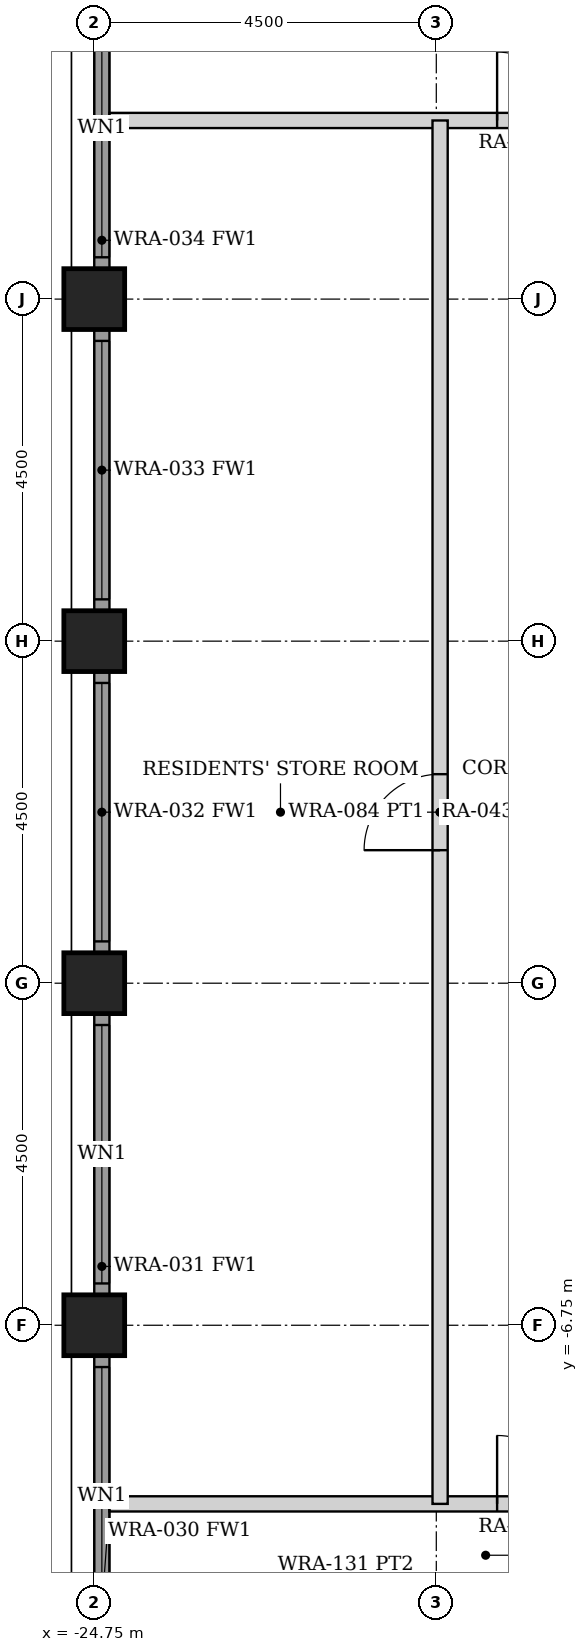
"""IFC4 building model, lengths in metres.
Left out: names, types, materials, properties, quantities, classifications, styles, units other than length and angle.
Written with IfcOpenShell. Run it as: python <this file> out.ifc"""

import sys

from ifc_helpers import new_model, si_unit, direction, frame, frame_2d, origin, origin_2d, place, context, subcontext, project, spatial, rectangle, hollow_rectangle, extrude, element, fill, save


model = new_model("IFC4")
c1 = context("Model", 3, precision=1e-05, world=origin(), true_north=direction((0.0, 1.0)))
c2 = subcontext(c1, "Body", "Model", "MODEL_VIEW")
j1 = project(units=[si_unit("LENGTHUNIT", "METRE"), si_unit("PLANEANGLEUNIT", "RADIAN")], contexts=[c1])
p1 = place(None, origin())
s1 = spatial("IfcSite", under=j1, at=p1, CompositionType="ELEMENT")
p2 = place(p1, origin())
s2 = spatial("IfcBuilding", under=s1, at=p2, CompositionType="ELEMENT")
p3 = place(p2, frame((0.0, 0.0, 30.0)))
s3 = spatial("IfcBuildingStorey", under=s2, at=p3, CompositionType="ELEMENT", Elevation=30.0)
for number, where, z_axis, x_axis in (
    (1, (-24.75, -6.75, 0.0), (0.0, 0.0, 1.0), (1.0, 0.0, 0.0)),
    (2, (-24.75, -2.25, 0.0), (0.0, 0.0, 1.0), (1.0, 0.0, 0.0)),
    (3, (-24.75, 2.25, 0.0), (0.0, 0.0, 1.0), (1.0, 0.0, 0.0)),
    (4, (-24.75, 6.75, 0.0), (0.0, 0.0, 1.0), (1.0, 0.0, 0.0)),
):
    element("IfcColumn", number, at=place(p3, frame(where, z_axis=z_axis, x_axis=x_axis)), inside=s3, PredefinedType="COLUMN", context=c2, shape_type="SweptSolid", body=[
        extrude(hollow_rectangle(XDim=0.8, YDim=0.8, WallThickness=0.08, at=origin_2d()), origin(), (0.0, 0.0, 1.0), 3.5),
    ])
p4 = place(p3, frame((-24.65, -10.845, 0.0), z_axis=(0.0, 0.0, 1.0), x_axis=(0.0, 1.0, 0.0)))
e5 = element("IfcWall", 5, at=p4, inside=s3, PredefinedType="SOLIDWALL", context=c2, shape_type="SweptSolid", body=[
    extrude(rectangle(XDim=3.69, YDim=0.2, at=frame_2d((1.845, 0.0))), origin(), (0.0, 0.0, 1.0), 2.379),
])
p5 = place(p4, frame((0.145, 0.0, 0.3)))
e6 = element("IfcOpeningElement", 6, at=p5, cuts=e5, PredefinedType="OPENING", context=c2, shape_type="SweptSolid", body=[
    extrude(rectangle(XDim=3.4, YDim=1.929, at=frame_2d((1.7, 0.964))), frame((0.0, 0.11, 0.0), z_axis=(0.0, -1.0, 0.0), x_axis=(1.0, 0.0, 0.0)), (0.0, 0.0, 1.0), 0.22),
])
p6 = place(p3, frame((-24.65, -6.345, 0.0), z_axis=(0.0, 0.0, 1.0), x_axis=(0.0, 1.0, 0.0)))
e7 = element("IfcWall", 7, at=p6, inside=s3, PredefinedType="SOLIDWALL", context=c2, shape_type="SweptSolid", body=[
    extrude(rectangle(XDim=3.69, YDim=0.2, at=frame_2d((1.845, 0.0))), origin(), (0.0, 0.0, 1.0), 2.379),
])
p7 = place(p6, frame((0.145, 0.0, 0.3)))
e8 = element("IfcOpeningElement", 8, at=p7, cuts=e7, PredefinedType="OPENING", context=c2, shape_type="SweptSolid", body=[
    extrude(rectangle(XDim=3.4, YDim=1.929, at=frame_2d((1.7, 0.964))), frame((0.0, 0.11, 0.0), z_axis=(0.0, -1.0, 0.0), x_axis=(1.0, 0.0, 0.0)), (0.0, 0.0, 1.0), 0.22),
])
p8 = place(p3, frame((-24.65, -1.845, 0.0), z_axis=(0.0, 0.0, 1.0), x_axis=(0.0, 1.0, 0.0)))
e9 = element("IfcWall", 9, at=p8, inside=s3, PredefinedType="SOLIDWALL", context=c2, shape_type="SweptSolid", body=[
    extrude(rectangle(XDim=3.69, YDim=0.2, at=frame_2d((1.845, 0.0))), origin(), (0.0, 0.0, 1.0), 2.379),
])
p9 = place(p8, frame((0.145, 0.0, 0.3)))
e10 = element("IfcOpeningElement", 10, at=p9, cuts=e9, PredefinedType="OPENING", context=c2, shape_type="SweptSolid", body=[
    extrude(rectangle(XDim=3.4, YDim=1.929, at=frame_2d((1.7, 0.964))), frame((0.0, 0.11, 0.0), z_axis=(0.0, -1.0, 0.0), x_axis=(1.0, 0.0, 0.0)), (0.0, 0.0, 1.0), 0.22),
])
p10 = place(p3, frame((-24.65, 2.655, 0.0), z_axis=(0.0, 0.0, 1.0), x_axis=(0.0, 1.0, 0.0)))
e11 = element("IfcWall", 11, at=p10, inside=s3, PredefinedType="SOLIDWALL", context=c2, shape_type="SweptSolid", body=[
    extrude(rectangle(XDim=3.69, YDim=0.2, at=frame_2d((1.845, 0.0))), origin(), (0.0, 0.0, 1.0), 2.379),
])
p11 = place(p10, frame((0.145, 0.0, 0.3)))
e12 = element("IfcOpeningElement", 12, at=p11, cuts=e11, PredefinedType="OPENING", context=c2, shape_type="SweptSolid", body=[
    extrude(rectangle(XDim=3.4, YDim=1.929, at=frame_2d((1.7, 0.964))), frame((0.0, 0.11, 0.0), z_axis=(0.0, -1.0, 0.0), x_axis=(1.0, 0.0, 0.0)), (0.0, 0.0, 1.0), 0.22),
])
p12 = place(p3, frame((-24.65, 7.155, 0.0), z_axis=(0.0, 0.0, 1.0), x_axis=(0.0, 1.0, 0.0)))
e13 = element("IfcWall", 13, at=p12, inside=s3, PredefinedType="SOLIDWALL", context=c2, shape_type="SweptSolid", body=[
    extrude(rectangle(XDim=3.69, YDim=0.2, at=frame_2d((1.845, 0.0))), origin(), (0.0, 0.0, 1.0), 2.379),
])
p13 = place(p12, frame((0.145, 0.0, 0.3)))
e14 = element("IfcOpeningElement", 14, at=p13, cuts=e13, PredefinedType="OPENING", context=c2, shape_type="SweptSolid", body=[
    extrude(rectangle(XDim=3.4, YDim=1.929, at=frame_2d((1.7, 0.964))), frame((0.0, 0.11, 0.0), z_axis=(0.0, -1.0, 0.0), x_axis=(1.0, 0.0, 0.0)), (0.0, 0.0, 1.0), 0.22),
])
p14 = place(p3, frame((-24.55, 9.1, 0.0), z_axis=(0.0, 0.0, 1.0), x_axis=(1.0, 0.0, 0.0)))
e15 = element("IfcWall", 15, at=p14, inside=s3, PredefinedType="PARTITIONING", context=c2, shape_type="SweptSolid", body=[
    extrude(rectangle(XDim=49.1, YDim=0.2, at=frame_2d((24.55, 0.0))), origin(), (0.0, 0.0, 1.0), 2.373),
])
p15 = place(p14, frame((5.1, 0.0, 0.0)))
e16 = element("IfcOpeningElement", 16, at=p15, cuts=e15, PredefinedType="OPENING", context=c2, shape_type="SweptSolid", body=[
    extrude(rectangle(XDim=0.9, YDim=2.1, at=frame_2d((0.45, 1.05))), frame((0.0, 0.11, 0.0), z_axis=(0.0, -1.0, 0.0), x_axis=(1.0, 0.0, 0.0)), (0.0, 0.0, 1.0), 0.22),
])
p16 = place(p14, frame((9.0, 0.0, 0.0)))
e17 = element("IfcOpeningElement", 17, at=p16, cuts=e15, PredefinedType="OPENING", context=c2, shape_type="SweptSolid", body=[
    extrude(rectangle(XDim=0.9, YDim=2.1, at=frame_2d((0.45, 1.05))), frame((0.0, 0.11, 0.0), z_axis=(0.0, -1.0, 0.0), x_axis=(1.0, 0.0, 0.0)), (0.0, 0.0, 1.0), 0.22),
])
p17 = place(p14, frame((13.5, 0.0, 0.0)))
e18 = element("IfcOpeningElement", 18, at=p17, cuts=e15, PredefinedType="OPENING", context=c2, shape_type="SweptSolid", body=[
    extrude(rectangle(XDim=0.9, YDim=2.1, at=frame_2d((0.45, 1.05))), frame((0.0, 0.11, 0.0), z_axis=(0.0, -1.0, 0.0), x_axis=(1.0, 0.0, 0.0)), (0.0, 0.0, 1.0), 0.22),
])
p18 = place(p14, frame((18.0, 0.0, 0.0)))
e19 = element("IfcOpeningElement", 19, at=p18, cuts=e15, PredefinedType="OPENING", context=c2, shape_type="SweptSolid", body=[
    extrude(rectangle(XDim=0.9, YDim=2.1, at=frame_2d((0.45, 1.05))), frame((0.0, 0.11, 0.0), z_axis=(0.0, -1.0, 0.0), x_axis=(1.0, 0.0, 0.0)), (0.0, 0.0, 1.0), 0.22),
])
p19 = place(p14, frame((22.5, 0.0, 0.0)))
e20 = element("IfcOpeningElement", 20, at=p19, cuts=e15, PredefinedType="OPENING", context=c2, shape_type="SweptSolid", body=[
    extrude(rectangle(XDim=0.9, YDim=2.1, at=frame_2d((0.45, 1.05))), frame((0.0, 0.11, 0.0), z_axis=(0.0, -1.0, 0.0), x_axis=(1.0, 0.0, 0.0)), (0.0, 0.0, 1.0), 0.22),
])
p20 = place(p14, frame((27.0, 0.0, 0.0)))
e21 = element("IfcOpeningElement", 21, at=p20, cuts=e15, PredefinedType="OPENING", context=c2, shape_type="SweptSolid", body=[
    extrude(rectangle(XDim=0.9, YDim=2.1, at=frame_2d((0.45, 1.05))), frame((0.0, 0.11, 0.0), z_axis=(0.0, -1.0, 0.0), x_axis=(1.0, 0.0, 0.0)), (0.0, 0.0, 1.0), 0.22),
])
p21 = place(p14, frame((31.5, 0.0, 0.0)))
e22 = element("IfcOpeningElement", 22, at=p21, cuts=e15, PredefinedType="OPENING", context=c2, shape_type="SweptSolid", body=[
    extrude(rectangle(XDim=0.9, YDim=2.1, at=frame_2d((0.45, 1.05))), frame((0.0, 0.11, 0.0), z_axis=(0.0, -1.0, 0.0), x_axis=(1.0, 0.0, 0.0)), (0.0, 0.0, 1.0), 0.22),
])
p22 = place(p14, frame((36.0, 0.0, 0.0)))
e23 = element("IfcOpeningElement", 23, at=p22, cuts=e15, PredefinedType="OPENING", context=c2, shape_type="SweptSolid", body=[
    extrude(rectangle(XDim=0.9, YDim=2.1, at=frame_2d((0.45, 1.05))), frame((0.0, 0.11, 0.0), z_axis=(0.0, -1.0, 0.0), x_axis=(1.0, 0.0, 0.0)), (0.0, 0.0, 1.0), 0.22),
])
p23 = place(p14, frame((43.1, 0.0, 0.0)))
e24 = element("IfcOpeningElement", 24, at=p23, cuts=e15, PredefinedType="OPENING", context=c2, shape_type="SweptSolid", body=[
    extrude(rectangle(XDim=0.9, YDim=2.1, at=frame_2d((0.45, 1.05))), frame((0.0, 0.11, 0.0), z_axis=(0.0, -1.0, 0.0), x_axis=(1.0, 0.0, 0.0)), (0.0, 0.0, 1.0), 0.22),
])
p24 = place(p3, frame((-24.55, -9.1, 0.0), z_axis=(0.0, 0.0, 1.0), x_axis=(1.0, 0.0, 0.0)))
e25 = element("IfcWall", 25, at=p24, inside=s3, PredefinedType="PARTITIONING", context=c2, shape_type="SweptSolid", body=[
    extrude(rectangle(XDim=49.1, YDim=0.2, at=frame_2d((24.55, 0.0))), origin(), (0.0, 0.0, 1.0), 2.373),
])
p25 = place(p24, frame((5.1, 0.0, 0.0)))
e26 = element("IfcOpeningElement", 26, at=p25, cuts=e25, PredefinedType="OPENING", context=c2, shape_type="SweptSolid", body=[
    extrude(rectangle(XDim=0.9, YDim=2.1, at=frame_2d((0.45, 1.05))), frame((0.0, 0.11, 0.0), z_axis=(0.0, -1.0, 0.0), x_axis=(1.0, 0.0, 0.0)), (0.0, 0.0, 1.0), 0.22),
])
p26 = place(p24, frame((9.0, 0.0, 0.0)))
e27 = element("IfcOpeningElement", 27, at=p26, cuts=e25, PredefinedType="OPENING", context=c2, shape_type="SweptSolid", body=[
    extrude(rectangle(XDim=0.9, YDim=2.1, at=frame_2d((0.45, 1.05))), frame((0.0, 0.11, 0.0), z_axis=(0.0, -1.0, 0.0), x_axis=(1.0, 0.0, 0.0)), (0.0, 0.0, 1.0), 0.22),
])
p27 = place(p24, frame((13.5, 0.0, 0.0)))
e28 = element("IfcOpeningElement", 28, at=p27, cuts=e25, PredefinedType="OPENING", context=c2, shape_type="SweptSolid", body=[
    extrude(rectangle(XDim=0.9, YDim=2.1, at=frame_2d((0.45, 1.05))), frame((0.0, 0.11, 0.0), z_axis=(0.0, -1.0, 0.0), x_axis=(1.0, 0.0, 0.0)), (0.0, 0.0, 1.0), 0.22),
])
p28 = place(p24, frame((18.0, 0.0, 0.0)))
e29 = element("IfcOpeningElement", 29, at=p28, cuts=e25, PredefinedType="OPENING", context=c2, shape_type="SweptSolid", body=[
    extrude(rectangle(XDim=0.9, YDim=2.1, at=frame_2d((0.45, 1.05))), frame((0.0, 0.11, 0.0), z_axis=(0.0, -1.0, 0.0), x_axis=(1.0, 0.0, 0.0)), (0.0, 0.0, 1.0), 0.22),
])
p29 = place(p24, frame((22.5, 0.0, 0.0)))
e30 = element("IfcOpeningElement", 30, at=p29, cuts=e25, PredefinedType="OPENING", context=c2, shape_type="SweptSolid", body=[
    extrude(rectangle(XDim=0.9, YDim=2.1, at=frame_2d((0.45, 1.05))), frame((0.0, 0.11, 0.0), z_axis=(0.0, -1.0, 0.0), x_axis=(1.0, 0.0, 0.0)), (0.0, 0.0, 1.0), 0.22),
])
p30 = place(p24, frame((27.0, 0.0, 0.0)))
e31 = element("IfcOpeningElement", 31, at=p30, cuts=e25, PredefinedType="OPENING", context=c2, shape_type="SweptSolid", body=[
    extrude(rectangle(XDim=0.9, YDim=2.1, at=frame_2d((0.45, 1.05))), frame((0.0, 0.11, 0.0), z_axis=(0.0, -1.0, 0.0), x_axis=(1.0, 0.0, 0.0)), (0.0, 0.0, 1.0), 0.22),
])
p31 = place(p24, frame((31.5, 0.0, 0.0)))
e32 = element("IfcOpeningElement", 32, at=p31, cuts=e25, PredefinedType="OPENING", context=c2, shape_type="SweptSolid", body=[
    extrude(rectangle(XDim=0.9, YDim=2.1, at=frame_2d((0.45, 1.05))), frame((0.0, 0.11, 0.0), z_axis=(0.0, -1.0, 0.0), x_axis=(1.0, 0.0, 0.0)), (0.0, 0.0, 1.0), 0.22),
])
p32 = place(p24, frame((36.0, 0.0, 0.0)))
e33 = element("IfcOpeningElement", 33, at=p32, cuts=e25, PredefinedType="OPENING", context=c2, shape_type="SweptSolid", body=[
    extrude(rectangle(XDim=0.9, YDim=2.1, at=frame_2d((0.45, 1.05))), frame((0.0, 0.11, 0.0), z_axis=(0.0, -1.0, 0.0), x_axis=(1.0, 0.0, 0.0)), (0.0, 0.0, 1.0), 0.22),
])
p33 = place(p24, frame((43.1, 0.0, 0.0)))
e34 = element("IfcOpeningElement", 34, at=p33, cuts=e25, PredefinedType="OPENING", context=c2, shape_type="SweptSolid", body=[
    extrude(rectangle(XDim=0.9, YDim=2.1, at=frame_2d((0.45, 1.05))), frame((0.0, 0.11, 0.0), z_axis=(0.0, -1.0, 0.0), x_axis=(1.0, 0.0, 0.0)), (0.0, 0.0, 1.0), 0.22),
])
p34 = place(p3, frame((-20.2, -9.1, 0.0), z_axis=(0.0, 0.0, 1.0), x_axis=(0.0, 1.0, 0.0)))
e35 = element("IfcWall", 35, at=p34, inside=s3, PredefinedType="PARTITIONING", context=c2, shape_type="SweptSolid", body=[
    extrude(rectangle(XDim=18.2, YDim=0.2, at=frame_2d((9.1, 0.0))), origin(), (0.0, 0.0, 1.0), 2.373),
])
p35 = place(p34, frame((8.6, 0.0, 0.0)))
e36 = element("IfcOpeningElement", 36, at=p35, cuts=e35, PredefinedType="OPENING", context=c2, shape_type="SweptSolid", body=[
    extrude(rectangle(XDim=1.0, YDim=2.1, at=frame_2d((0.5, 1.05))), frame((0.0, 0.11, 0.0), z_axis=(0.0, -1.0, 0.0), x_axis=(1.0, 0.0, 0.0)), (0.0, 0.0, 1.0), 0.22),
])
p36 = place(p5, origin())
e37 = element("IfcWindow", 37, at=p36, inside=s3, PartitioningType="SINGLE_PANEL", PredefinedType="WINDOW", context=c2, shape_type="SweptSolid", body=[
    extrude(rectangle(XDim=3.4, YDim=1.929, at=frame_2d((1.7, 0.964))), frame((0.0, 0.03, 0.0), z_axis=(0.0, -1.0, 0.0), x_axis=(1.0, 0.0, 0.0)), (0.0, 0.0, 1.0), 0.06),
])
fill(e6, e37)
p37 = place(p7, origin())
e38 = element("IfcWindow", 38, at=p37, inside=s3, PartitioningType="SINGLE_PANEL", PredefinedType="WINDOW", context=c2, shape_type="SweptSolid", body=[
    extrude(rectangle(XDim=3.4, YDim=1.929, at=frame_2d((1.7, 0.964))), frame((0.0, 0.03, 0.0), z_axis=(0.0, -1.0, 0.0), x_axis=(1.0, 0.0, 0.0)), (0.0, 0.0, 1.0), 0.06),
])
fill(e8, e38)
p38 = place(p9, origin())
e39 = element("IfcWindow", 39, at=p38, inside=s3, PartitioningType="SINGLE_PANEL", PredefinedType="WINDOW", context=c2, shape_type="SweptSolid", body=[
    extrude(rectangle(XDim=3.4, YDim=1.929, at=frame_2d((1.7, 0.964))), frame((0.0, 0.03, 0.0), z_axis=(0.0, -1.0, 0.0), x_axis=(1.0, 0.0, 0.0)), (0.0, 0.0, 1.0), 0.06),
])
fill(e10, e39)
p39 = place(p11, origin())
e40 = element("IfcWindow", 40, at=p39, inside=s3, PartitioningType="SINGLE_PANEL", PredefinedType="WINDOW", context=c2, shape_type="SweptSolid", body=[
    extrude(rectangle(XDim=3.4, YDim=1.929, at=frame_2d((1.7, 0.964))), frame((0.0, 0.03, 0.0), z_axis=(0.0, -1.0, 0.0), x_axis=(1.0, 0.0, 0.0)), (0.0, 0.0, 1.0), 0.06),
])
fill(e12, e40)
p40 = place(p13, origin())
e41 = element("IfcWindow", 41, at=p40, inside=s3, PartitioningType="SINGLE_PANEL", PredefinedType="WINDOW", context=c2, shape_type="SweptSolid", body=[
    extrude(rectangle(XDim=3.4, YDim=1.929, at=frame_2d((1.7, 0.964))), frame((0.0, 0.03, 0.0), z_axis=(0.0, -1.0, 0.0), x_axis=(1.0, 0.0, 0.0)), (0.0, 0.0, 1.0), 0.06),
])
fill(e14, e41)
p41 = place(p15, origin())
e42 = element("IfcDoor", 42, at=p41, inside=s3, OperationType="SINGLE_SWING_LEFT", PredefinedType="DOOR", context=c2, shape_type="SweptSolid", body=[
    extrude(rectangle(XDim=0.9, YDim=2.1, at=frame_2d((0.45, 1.05))), frame((0.0, 0.025, 0.0), z_axis=(0.0, -1.0, 0.0), x_axis=(1.0, 0.0, 0.0)), (0.0, 0.0, 1.0), 0.05),
])
fill(e16, e42)
p42 = place(p25, origin())
e43 = element("IfcDoor", 43, at=p42, inside=s3, OperationType="SINGLE_SWING_LEFT", PredefinedType="DOOR", context=c2, shape_type="SweptSolid", body=[
    extrude(rectangle(XDim=0.9, YDim=2.1, at=frame_2d((0.45, 1.05))), frame((0.0, 0.025, 0.0), z_axis=(0.0, -1.0, 0.0), x_axis=(1.0, 0.0, 0.0)), (0.0, 0.0, 1.0), 0.05),
])
fill(e26, e43)
p43 = place(p35, origin())
e44 = element("IfcDoor", 44, at=p43, inside=s3, OperationType="SINGLE_SWING_LEFT", PredefinedType="DOOR", context=c2, shape_type="SweptSolid", body=[
    extrude(rectangle(XDim=1.0, YDim=2.1, at=frame_2d((0.5, 1.05))), frame((0.0, 0.025, 0.0), z_axis=(0.0, -1.0, 0.0), x_axis=(1.0, 0.0, 0.0)), (0.0, 0.0, 1.0), 0.05),
])
fill(e36, e44)
save(model, sys.argv[1])
